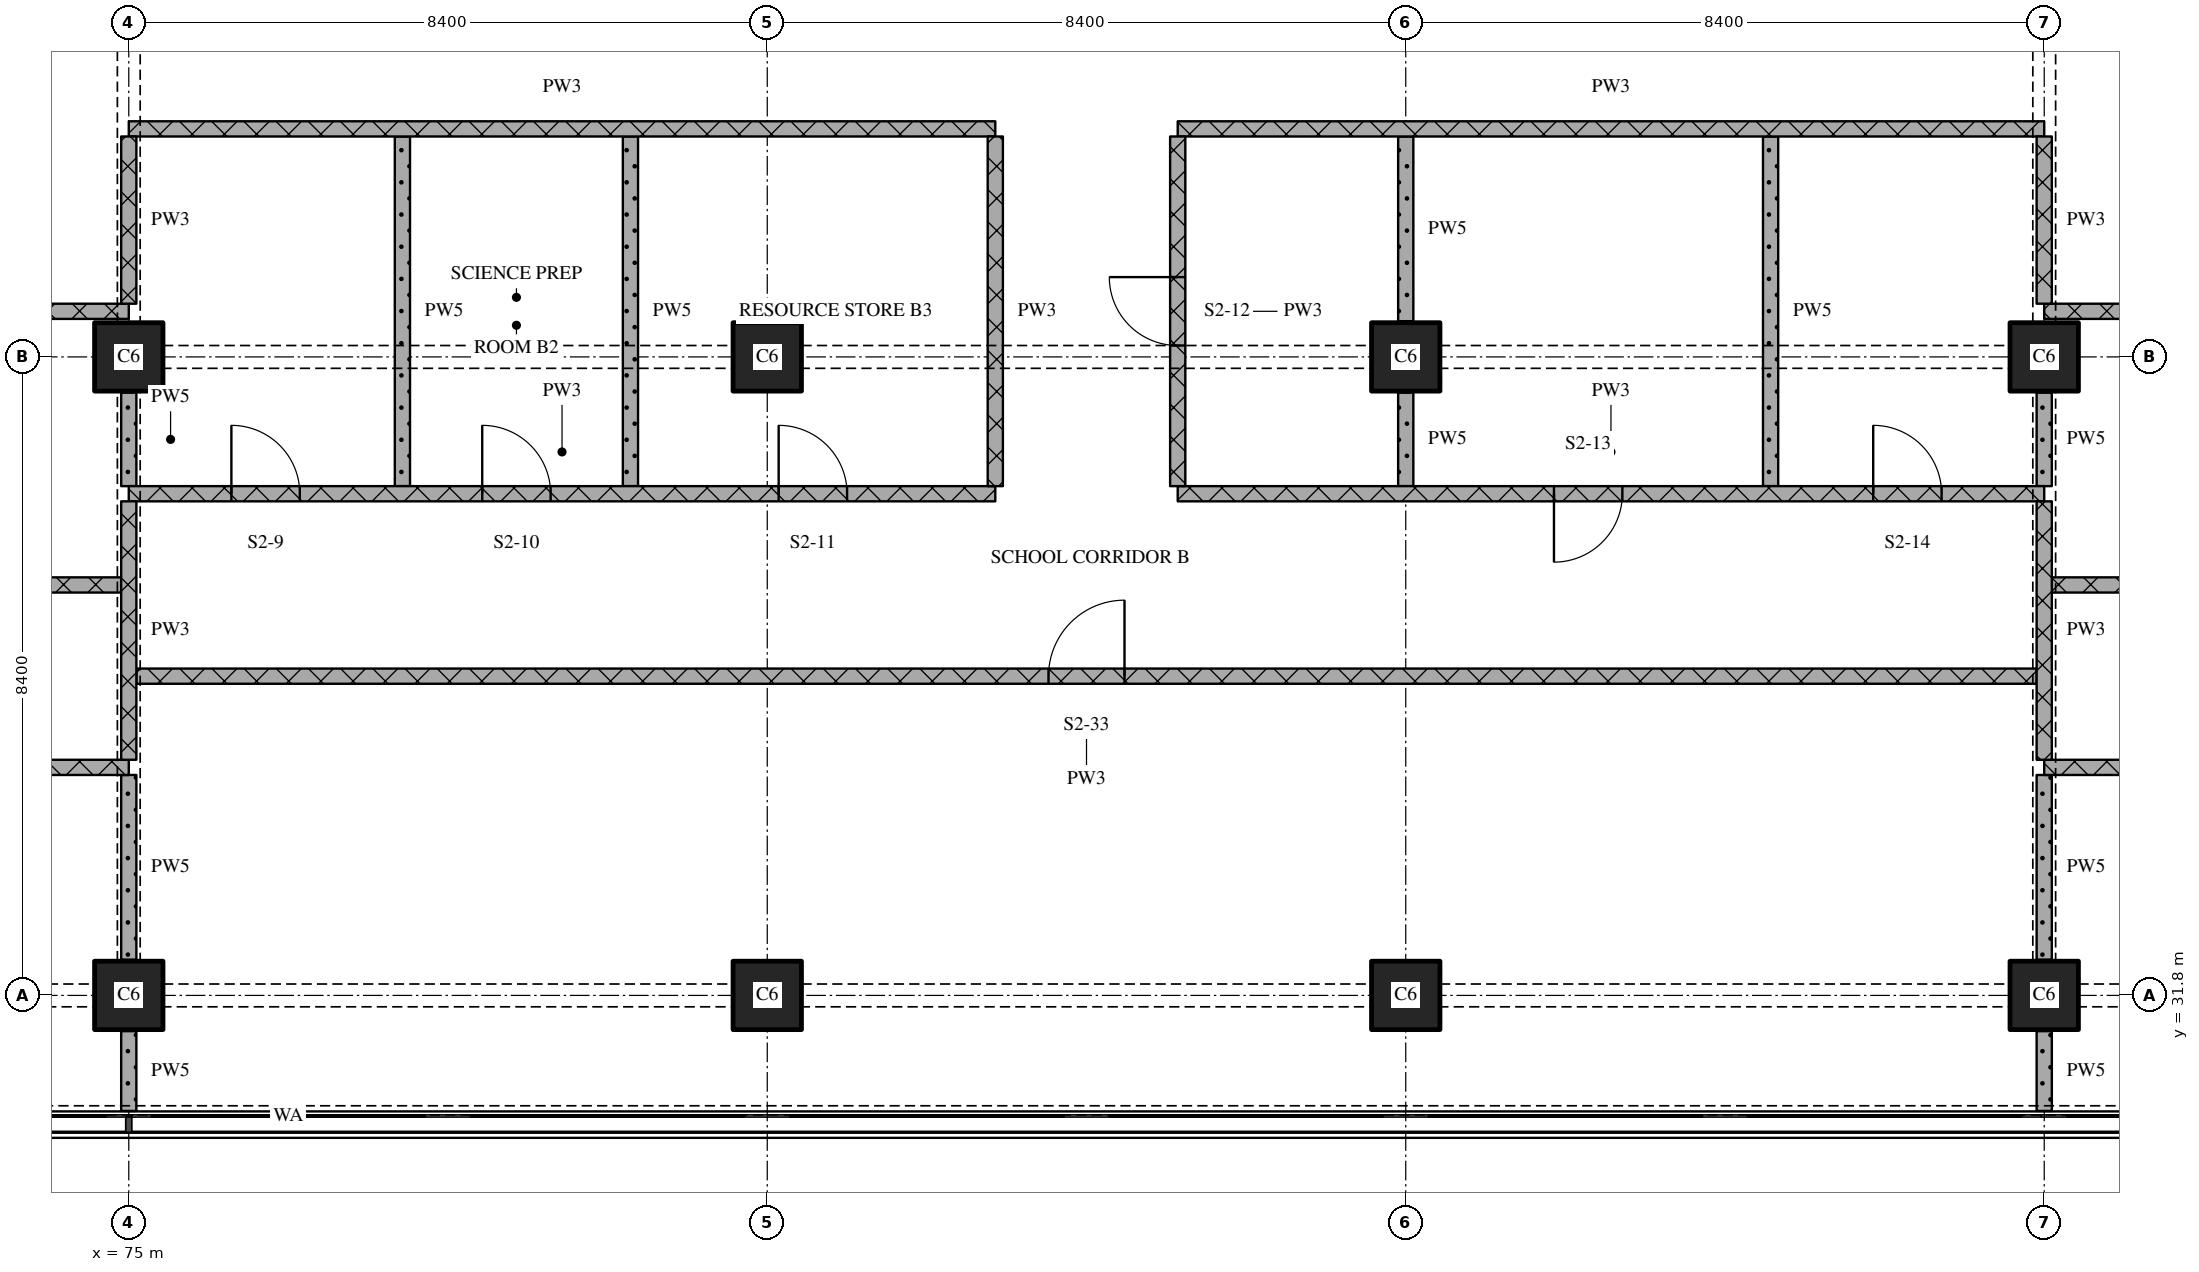
"""IFC4 building model, lengths in metres.
Left out: names, types, materials, properties, quantities, classifications, styles, units other than length and angle.
Written with IfcOpenShell. Run it as: python <this file> out.ifc"""

import sys

from ifc_helpers import new_model, si_unit, direction, frame, frame_2d, origin, origin_2d, place, context, subcontext, project, spatial, rectangle, extrude, element, fill, save


model = new_model("IFC4")
c1 = context("Model", 3, precision=1e-05, world=origin(), true_north=direction((0.0, 1.0)))
c2 = subcontext(c1, "Body", "Model", "MODEL_VIEW")
j1 = project(units=[si_unit("LENGTHUNIT", "METRE"), si_unit("PLANEANGLEUNIT", "RADIAN")], contexts=[c1])
p1 = place(None, origin())
s1 = spatial("IfcSite", under=j1, at=p1, CompositionType="ELEMENT")
p2 = place(p1, origin())
s2 = spatial("IfcBuilding", under=s1, at=p2, CompositionType="ELEMENT")
p3 = place(p2, frame((0.0, 0.0, 23.7)))
s3 = spatial("IfcBuildingStorey", under=s2, at=p3, CompositionType="ELEMENT", Elevation=23.7)
for number, where, z_axis, x_axis in (
    (1, (75.0, 31.8, 0.0), (0.0, 0.0, 1.0), (1.0, 0.0, 0.0)),
    (2, (75.0, 40.2, 0.0), (0.0, 0.0, 1.0), (1.0, 0.0, 0.0)),
    (3, (83.4, 31.8, 0.0), (0.0, 0.0, 1.0), (1.0, 0.0, 0.0)),
    (4, (83.4, 40.2, 0.0), (0.0, 0.0, 1.0), (1.0, 0.0, 0.0)),
    (5, (91.8, 31.8, 0.0), (0.0, 0.0, 1.0), (1.0, 0.0, 0.0)),
    (6, (91.8, 40.2, 0.0), (0.0, 0.0, 1.0), (1.0, 0.0, 0.0)),
    (7, (100.2, 31.8, 0.0), (0.0, 0.0, 1.0), (1.0, 0.0, 0.0)),
    (8, (100.2, 40.2, 0.0), (0.0, 0.0, 1.0), (1.0, 0.0, 0.0)),
):
    element("IfcColumn", number, at=place(p3, frame(where, z_axis=z_axis, x_axis=x_axis)), inside=s3, PredefinedType="COLUMN", context=c2, shape_type="SweptSolid", body=[
        extrude(rectangle(XDim=0.9, YDim=0.9, at=origin_2d()), origin(), (0.0, 0.0, 1.0), 4.5),
    ])
p4 = place(p3, frame((75.0, 34.8, 0.0), z_axis=(0.0, 0.0, 1.0), x_axis=(-1.0, 0.0, 0.0)))
e9 = element("IfcWall", 9, at=p4, inside=s3, PredefinedType="PARTITIONING", context=c2, shape_type="SweptSolid", body=[
    extrude(rectangle(XDim=26.72, YDim=0.2, at=frame_2d((13.36, 0.0))), origin(), (0.0, 0.0, 1.0), 4.2),
])
p5 = place(p4, frame((11.204, 0.0, 0.0)))
e10 = element("IfcOpeningElement", 10, at=p5, cuts=e9, PredefinedType="OPENING", context=c2, shape_type="SweptSolid", body=[
    extrude(rectangle(XDim=1.0, YDim=2.1, at=frame_2d((0.5, 1.05))), frame((0.0, 0.11, 0.0), z_axis=(0.0, -1.0, 0.0), x_axis=(1.0, 0.0, 0.0)), (0.0, 0.0, 1.0), 0.22),
])
p6 = place(p3, frame((126.92, 34.8, 0.0), z_axis=(0.0, 0.0, 1.0), x_axis=(-1.0, 0.0, 0.0)))
e11 = element("IfcWall", 11, at=p6, inside=s3, PredefinedType="PARTITIONING", context=c2, shape_type="SweptSolid", body=[
    extrude(rectangle(XDim=26.72, YDim=0.2, at=frame_2d((13.36, 0.0))), origin(), (0.0, 0.0, 1.0), 4.2),
])
p7 = place(p6, frame((14.516, 0.0, 0.0)))
e12 = element("IfcOpeningElement", 12, at=p7, cuts=e11, PredefinedType="OPENING", context=c2, shape_type="SweptSolid", body=[
    extrude(rectangle(XDim=1.0, YDim=2.1, at=frame_2d((0.5, 1.05))), frame((0.0, 0.11, 0.0), z_axis=(0.0, -1.0, 0.0), x_axis=(1.0, 0.0, 0.0)), (0.0, 0.0, 1.0), 0.22),
])
p8 = place(p3, frame((100.1, 36.0, 0.0), z_axis=(0.0, 0.0, 1.0), x_axis=(-1.0, 0.0, 0.0)))
e13 = element("IfcWall", 13, at=p8, inside=s3, PredefinedType="PARTITIONING", context=c2, shape_type="SweptSolid", body=[
    extrude(rectangle(XDim=25.0, YDim=0.2, at=frame_2d((12.5, 0.0))), origin(), (0.0, 0.0, 1.0), 4.2),
])
p9 = place(p8, frame((12.0, 0.0, 0.0)))
e14 = element("IfcOpeningElement", 14, at=p9, cuts=e13, PredefinedType="OPENING", context=c2, shape_type="SweptSolid", body=[
    extrude(rectangle(XDim=1.0, YDim=2.1, at=frame_2d((0.5, 1.05))), frame((0.0, 0.11, 0.0), z_axis=(0.0, -1.0, 0.0), x_axis=(1.0, 0.0, 0.0)), (0.0, 0.0, 1.0), 0.22),
])
p10 = place(p3, frame((63.9, 37.2, 0.0), z_axis=(0.0, 0.0, 1.0), x_axis=(1.0, 0.0, 0.0)))
e15 = element("IfcWall", 15, at=p10, inside=s3, PredefinedType="PARTITIONING", context=c2, shape_type="SweptSolid", body=[
    extrude(rectangle(XDim=11.0, YDim=0.2, at=frame_2d((5.5, 0.0))), origin(), (0.0, 0.0, 1.0), 4.2),
])
p11 = place(p10, frame((7.5, 0.0, 0.0)))
e16 = element("IfcOpeningElement", 16, at=p11, cuts=e15, PredefinedType="OPENING", context=c2, shape_type="SweptSolid", body=[
    extrude(rectangle(XDim=0.9, YDim=2.1, at=frame_2d((0.45, 1.05))), frame((0.0, 0.11, 0.0), z_axis=(0.0, -1.0, 0.0), x_axis=(1.0, 0.0, 0.0)), (0.0, 0.0, 1.0), 0.22),
])
p12 = place(p3, frame((100.3, 37.2, 0.0), z_axis=(0.0, 0.0, 1.0), x_axis=(1.0, 0.0, 0.0)))
e17 = element("IfcWall", 17, at=p12, inside=s3, PredefinedType="PARTITIONING", context=c2, shape_type="SweptSolid", body=[
    extrude(rectangle(XDim=11.0, YDim=0.2, at=frame_2d((5.5, 0.0))), origin(), (0.0, 0.0, 1.0), 4.2),
])
p13 = place(p12, frame((1.85, 0.0, 0.0)))
e18 = element("IfcOpeningElement", 18, at=p13, cuts=e17, PredefinedType="OPENING", context=c2, shape_type="SweptSolid", body=[
    extrude(rectangle(XDim=0.9, YDim=2.1, at=frame_2d((0.45, 1.05))), frame((0.0, 0.11, 0.0), z_axis=(0.0, -1.0, 0.0), x_axis=(1.0, 0.0, 0.0)), (0.0, 0.0, 1.0), 0.22),
])
p14 = place(p12, frame((7.4, 0.0, 0.0)))
e19 = element("IfcOpeningElement", 19, at=p14, cuts=e17, PredefinedType="OPENING", context=c2, shape_type="SweptSolid", body=[
    extrude(rectangle(XDim=0.9, YDim=2.1, at=frame_2d((0.45, 1.05))), frame((0.0, 0.11, 0.0), z_axis=(0.0, -1.0, 0.0), x_axis=(1.0, 0.0, 0.0)), (0.0, 0.0, 1.0), 0.22),
])
p15 = place(p3, frame((75.0, 38.4, 0.0), z_axis=(0.0, 0.0, 1.0), x_axis=(1.0, 0.0, 0.0)))
e20 = element("IfcWall", 20, at=p15, inside=s3, PredefinedType="PARTITIONING", context=c2, shape_type="SweptSolid", body=[
    extrude(rectangle(XDim=11.4, YDim=0.2, at=frame_2d((5.7, 0.0))), origin(), (0.0, 0.0, 1.0), 4.2),
])
p16 = place(p15, frame((1.35, 0.0, 0.0)))
e21 = element("IfcOpeningElement", 21, at=p16, cuts=e20, PredefinedType="OPENING", context=c2, shape_type="SweptSolid", body=[
    extrude(rectangle(XDim=0.9, YDim=2.1, at=frame_2d((0.45, 1.05))), frame((0.0, 0.11, 0.0), z_axis=(0.0, -1.0, 0.0), x_axis=(1.0, 0.0, 0.0)), (0.0, 0.0, 1.0), 0.22),
])
p17 = place(p15, frame((4.65, 0.0, 0.0)))
e22 = element("IfcOpeningElement", 22, at=p17, cuts=e20, PredefinedType="OPENING", context=c2, shape_type="SweptSolid", body=[
    extrude(rectangle(XDim=0.9, YDim=2.1, at=frame_2d((0.45, 1.05))), frame((0.0, 0.11, 0.0), z_axis=(0.0, -1.0, 0.0), x_axis=(1.0, 0.0, 0.0)), (0.0, 0.0, 1.0), 0.22),
])
p18 = place(p15, frame((8.55, 0.0, 0.0)))
e23 = element("IfcOpeningElement", 23, at=p18, cuts=e20, PredefinedType="OPENING", context=c2, shape_type="SweptSolid", body=[
    extrude(rectangle(XDim=0.9, YDim=2.1, at=frame_2d((0.45, 1.05))), frame((0.0, 0.11, 0.0), z_axis=(0.0, -1.0, 0.0), x_axis=(1.0, 0.0, 0.0)), (0.0, 0.0, 1.0), 0.22),
])
p19 = place(p3, frame((88.8, 38.4, 0.0), z_axis=(0.0, 0.0, 1.0), x_axis=(1.0, 0.0, 0.0)))
e24 = element("IfcWall", 24, at=p19, inside=s3, PredefinedType="PARTITIONING", context=c2, shape_type="SweptSolid", body=[
    extrude(rectangle(XDim=11.4, YDim=0.2, at=frame_2d((5.7, 0.0))), origin(), (0.0, 0.0, 1.0), 4.2),
])
p20 = place(p19, frame((4.95, 0.0, 0.0)))
e25 = element("IfcOpeningElement", 25, at=p20, cuts=e24, PredefinedType="OPENING", context=c2, shape_type="SweptSolid", body=[
    extrude(rectangle(XDim=0.9, YDim=2.1, at=frame_2d((0.45, 1.05))), frame((0.0, 0.11, 0.0), z_axis=(0.0, -1.0, 0.0), x_axis=(1.0, 0.0, 0.0)), (0.0, 0.0, 1.0), 0.22),
])
p21 = place(p19, frame((9.15, 0.0, 0.0)))
e26 = element("IfcOpeningElement", 26, at=p21, cuts=e24, PredefinedType="OPENING", context=c2, shape_type="SweptSolid", body=[
    extrude(rectangle(XDim=0.9, YDim=2.1, at=frame_2d((0.45, 1.05))), frame((0.0, 0.11, 0.0), z_axis=(0.0, -1.0, 0.0), x_axis=(1.0, 0.0, 0.0)), (0.0, 0.0, 1.0), 0.22),
])
for number, where, z_axis, x_axis in (
    (27, (63.9, 40.8, 0.0), (0.0, 0.0, 1.0), (1.0, 0.0, 0.0)),
    (28, (100.2, 40.8, 0.0), (0.0, 0.0, 1.0), (1.0, 0.0, 0.0)),
):
    element("IfcWall", number, at=place(p3, frame(where, z_axis=z_axis, x_axis=x_axis)), inside=s3, PredefinedType="PARTITIONING", context=c2, shape_type="SweptSolid", body=[
        extrude(rectangle(XDim=11.1, YDim=0.2, at=frame_2d((5.55, 0.0))), origin(), (0.0, 0.0, 1.0), 4.2),
    ])
for number, where, z_axis, x_axis in (
    (29, (75.0, 43.2, 0.0), (0.0, 0.0, 1.0), (1.0, 0.0, 0.0)),
    (30, (88.8, 43.2, 0.0), (0.0, 0.0, 1.0), (1.0, 0.0, 0.0)),
):
    element("IfcWall", number, at=place(p3, frame(where, z_axis=z_axis, x_axis=x_axis)), inside=s3, PredefinedType="PARTITIONING", context=c2, shape_type="SweptSolid", body=[
        extrude(rectangle(XDim=11.4, YDim=0.2, at=frame_2d((5.7, 0.0))), origin(), (0.0, 0.0, 1.0), 4.2),
    ])
p22 = place(p3, frame((75.0, 38.3, 0.0), z_axis=(0.0, 0.0, 1.0), x_axis=(0.0, -1.0, 0.0)))
e31 = element("IfcWall", 31, at=p22, inside=s3, PredefinedType="PARTITIONING", context=c2, shape_type="SweptSolid", body=[
    extrude(rectangle(XDim=3.4, YDim=0.2, at=frame_2d((1.7, 0.0))), origin(), (0.0, 0.0, 1.0), 3.7),
])
p23 = place(p3, frame((75.0, 43.1, 0.0), z_axis=(0.0, 0.0, 1.0), x_axis=(0.0, -1.0, 0.0)))
e32 = element("IfcWall", 32, at=p23, inside=s3, PredefinedType="PARTITIONING", context=c2, shape_type="SweptSolid", body=[
    extrude(rectangle(XDim=2.2, YDim=0.2, at=frame_2d((1.1, 0.0))), origin(), (0.0, 0.0, 1.0), 3.3),
])
p24 = place(p3, frame((75.0, 31.33, 0.0), z_axis=(0.0, 0.0, 1.0), x_axis=(0.0, -1.0, 0.0)))
e33 = element("IfcWall", 33, at=p24, inside=s3, PredefinedType="PARTITIONING", context=c2, shape_type="SweptSolid", body=[
    extrude(rectangle(XDim=1.05, YDim=0.2, at=frame_2d((0.525, 0.0))), origin(), (0.0, 0.0, 1.0), 4.2),
])
p25 = place(p3, frame((75.0, 34.7, 0.0), z_axis=(0.0, 0.0, 1.0), x_axis=(0.0, -1.0, 0.0)))
e34 = element("IfcWall", 34, at=p25, inside=s3, PredefinedType="PARTITIONING", context=c2, shape_type="SweptSolid", body=[
    extrude(rectangle(XDim=2.43, YDim=0.2, at=frame_2d((1.215, 0.0))), origin(), (0.0, 0.0, 1.0), 3.7),
])
p26 = place(p3, frame((75.0, 39.73, 0.0), z_axis=(0.0, 0.0, 1.0), x_axis=(0.0, -1.0, 0.0)))
e35 = element("IfcWall", 35, at=p26, inside=s3, PredefinedType="PARTITIONING", context=c2, shape_type="SweptSolid", body=[
    extrude(rectangle(XDim=1.23, YDim=0.2, at=frame_2d((0.615, 0.0))), origin(), (0.0, 0.0, 1.0), 3.7),
])
for number, where, z_axis, x_axis in (
    (36, (78.6, 43.1, 0.0), (0.0, 0.0, 1.0), (0.0, -1.0, 0.0)),
    (37, (81.6, 43.1, 0.0), (0.0, 0.0, 1.0), (0.0, -1.0, 0.0)),
    (38, (86.4, 43.1, 0.0), (0.0, 0.0, 1.0), (0.0, -1.0, 0.0)),
):
    element("IfcWall", number, at=place(p3, frame(where, z_axis=z_axis, x_axis=x_axis)), inside=s3, PredefinedType="PARTITIONING", context=c2, shape_type="SweptSolid", body=[
        extrude(rectangle(XDim=4.6, YDim=0.2, at=frame_2d((2.3, 0.0))), origin(), (0.0, 0.0, 1.0), 4.2),
    ])
p27 = place(p3, frame((88.8, 43.1, 0.0), z_axis=(0.0, 0.0, 1.0), x_axis=(0.0, -1.0, 0.0)))
e39 = element("IfcWall", 39, at=p27, inside=s3, PredefinedType="PARTITIONING", context=c2, shape_type="SweptSolid", body=[
    extrude(rectangle(XDim=4.6, YDim=0.2, at=frame_2d((2.3, 0.0))), origin(), (0.0, 0.0, 1.0), 4.2),
])
p28 = place(p27, frame((1.85, 0.0, 0.0)))
e40 = element("IfcOpeningElement", 40, at=p28, cuts=e39, PredefinedType="OPENING", context=c2, shape_type="SweptSolid", body=[
    extrude(rectangle(XDim=0.9, YDim=2.1, at=frame_2d((0.45, 1.05))), frame((0.0, 0.11, 0.0), z_axis=(0.0, -1.0, 0.0), x_axis=(1.0, 0.0, 0.0)), (0.0, 0.0, 1.0), 0.22),
])
p29 = place(p3, frame((91.8, 39.73, 0.0), z_axis=(0.0, 0.0, 1.0), x_axis=(0.0, -1.0, 0.0)))
e41 = element("IfcWall", 41, at=p29, inside=s3, PredefinedType="PARTITIONING", context=c2, shape_type="SweptSolid", body=[
    extrude(rectangle(XDim=1.23, YDim=0.2, at=frame_2d((0.615, 0.0))), origin(), (0.0, 0.0, 1.0), 4.2),
])
p30 = place(p3, frame((91.8, 43.1, 0.0), z_axis=(0.0, 0.0, 1.0), x_axis=(0.0, -1.0, 0.0)))
e42 = element("IfcWall", 42, at=p30, inside=s3, PredefinedType="PARTITIONING", context=c2, shape_type="SweptSolid", body=[
    extrude(rectangle(XDim=2.43, YDim=0.2, at=frame_2d((1.215, 0.0))), origin(), (0.0, 0.0, 1.0), 4.2),
])
p31 = place(p3, frame((96.6, 43.1, 0.0), z_axis=(0.0, 0.0, 1.0), x_axis=(0.0, -1.0, 0.0)))
e43 = element("IfcWall", 43, at=p31, inside=s3, PredefinedType="PARTITIONING", context=c2, shape_type="SweptSolid", body=[
    extrude(rectangle(XDim=4.6, YDim=0.2, at=frame_2d((2.3, 0.0))), origin(), (0.0, 0.0, 1.0), 4.2),
])
p32 = place(p3, frame((100.2, 38.3, 0.0), z_axis=(0.0, 0.0, 1.0), x_axis=(0.0, -1.0, 0.0)))
e44 = element("IfcWall", 44, at=p32, inside=s3, PredefinedType="PARTITIONING", context=c2, shape_type="SweptSolid", body=[
    extrude(rectangle(XDim=3.4, YDim=0.2, at=frame_2d((1.7, 0.0))), origin(), (0.0, 0.0, 1.0), 3.7),
])
p33 = place(p3, frame((100.2, 43.1, 0.0), z_axis=(0.0, 0.0, 1.0), x_axis=(0.0, -1.0, 0.0)))
e45 = element("IfcWall", 45, at=p33, inside=s3, PredefinedType="PARTITIONING", context=c2, shape_type="SweptSolid", body=[
    extrude(rectangle(XDim=2.2, YDim=0.2, at=frame_2d((1.1, 0.0))), origin(), (0.0, 0.0, 1.0), 3.3),
])
p34 = place(p3, frame((100.2, 31.33, 0.0), z_axis=(0.0, 0.0, 1.0), x_axis=(0.0, -1.0, 0.0)))
e46 = element("IfcWall", 46, at=p34, inside=s3, PredefinedType="PARTITIONING", context=c2, shape_type="SweptSolid", body=[
    extrude(rectangle(XDim=1.05, YDim=0.2, at=frame_2d((0.525, 0.0))), origin(), (0.0, 0.0, 1.0), 4.2),
])
p35 = place(p3, frame((100.2, 34.7, 0.0), z_axis=(0.0, 0.0, 1.0), x_axis=(0.0, -1.0, 0.0)))
e47 = element("IfcWall", 47, at=p35, inside=s3, PredefinedType="PARTITIONING", context=c2, shape_type="SweptSolid", body=[
    extrude(rectangle(XDim=2.43, YDim=0.2, at=frame_2d((1.215, 0.0))), origin(), (0.0, 0.0, 1.0), 3.7),
])
p36 = place(p3, frame((100.2, 39.73, 0.0), z_axis=(0.0, 0.0, 1.0), x_axis=(0.0, -1.0, 0.0)))
e48 = element("IfcWall", 48, at=p36, inside=s3, PredefinedType="PARTITIONING", context=c2, shape_type="SweptSolid", body=[
    extrude(rectangle(XDim=1.23, YDim=0.2, at=frame_2d((0.615, 0.0))), origin(), (0.0, 0.0, 1.0), 3.7),
])
p37 = place(p9, origin())
e49 = element("IfcDoor", 49, at=p37, inside=s3, OperationType="SINGLE_SWING_RIGHT", PredefinedType="DOOR", context=c2, shape_type="SweptSolid", body=[
    extrude(rectangle(XDim=1.0, YDim=2.1, at=frame_2d((0.5, 1.05))), frame((0.0, 0.025, 0.0), z_axis=(0.0, -1.0, 0.0), x_axis=(1.0, 0.0, 0.0)), (0.0, 0.0, 1.0), 0.05),
])
fill(e14, e49)
p38 = place(p16, origin())
e50 = element("IfcDoor", 50, at=p38, inside=s3, OperationType="SINGLE_SWING_LEFT", PredefinedType="DOOR", context=c2, shape_type="SweptSolid", body=[
    extrude(rectangle(XDim=0.9, YDim=2.1, at=frame_2d((0.45, 1.05))), frame((0.0, 0.025, 0.0), z_axis=(0.0, -1.0, 0.0), x_axis=(1.0, 0.0, 0.0)), (0.0, 0.0, 1.0), 0.05),
])
fill(e21, e50)
p39 = place(p17, origin())
e51 = element("IfcDoor", 51, at=p39, inside=s3, OperationType="SINGLE_SWING_LEFT", PredefinedType="DOOR", context=c2, shape_type="SweptSolid", body=[
    extrude(rectangle(XDim=0.9, YDim=2.1, at=frame_2d((0.45, 1.05))), frame((0.0, 0.025, 0.0), z_axis=(0.0, -1.0, 0.0), x_axis=(1.0, 0.0, 0.0)), (0.0, 0.0, 1.0), 0.05),
])
fill(e22, e51)
p40 = place(p18, origin())
e52 = element("IfcDoor", 52, at=p40, inside=s3, OperationType="SINGLE_SWING_LEFT", PredefinedType="DOOR", context=c2, shape_type="SweptSolid", body=[
    extrude(rectangle(XDim=0.9, YDim=2.1, at=frame_2d((0.45, 1.05))), frame((0.0, 0.025, 0.0), z_axis=(0.0, -1.0, 0.0), x_axis=(1.0, 0.0, 0.0)), (0.0, 0.0, 1.0), 0.05),
])
fill(e23, e52)
p41 = place(p20, origin())
e53 = element("IfcDoor", 53, at=p41, inside=s3, OperationType="SINGLE_SWING_RIGHT", PredefinedType="DOOR", context=c2, shape_type="SweptSolid", body=[
    extrude(rectangle(XDim=0.9, YDim=2.1, at=frame_2d((0.45, 1.05))), frame((0.0, 0.025, 0.0), z_axis=(0.0, -1.0, 0.0), x_axis=(1.0, 0.0, 0.0)), (0.0, 0.0, 1.0), 0.05),
])
fill(e25, e53)
p42 = place(p21, origin())
e54 = element("IfcDoor", 54, at=p42, inside=s3, OperationType="SINGLE_SWING_LEFT", PredefinedType="DOOR", context=c2, shape_type="SweptSolid", body=[
    extrude(rectangle(XDim=0.9, YDim=2.1, at=frame_2d((0.45, 1.05))), frame((0.0, 0.025, 0.0), z_axis=(0.0, -1.0, 0.0), x_axis=(1.0, 0.0, 0.0)), (0.0, 0.0, 1.0), 0.05),
])
fill(e26, e54)
p43 = place(p28, origin())
e55 = element("IfcDoor", 55, at=p43, inside=s3, OperationType="SINGLE_SWING_RIGHT", PredefinedType="DOOR", context=c2, shape_type="SweptSolid", body=[
    extrude(rectangle(XDim=0.9, YDim=2.1, at=frame_2d((0.45, 1.05))), frame((0.0, 0.025, 0.0), z_axis=(0.0, -1.0, 0.0), x_axis=(1.0, 0.0, 0.0)), (0.0, 0.0, 1.0), 0.05),
])
fill(e40, e55)
save(model, sys.argv[1])
